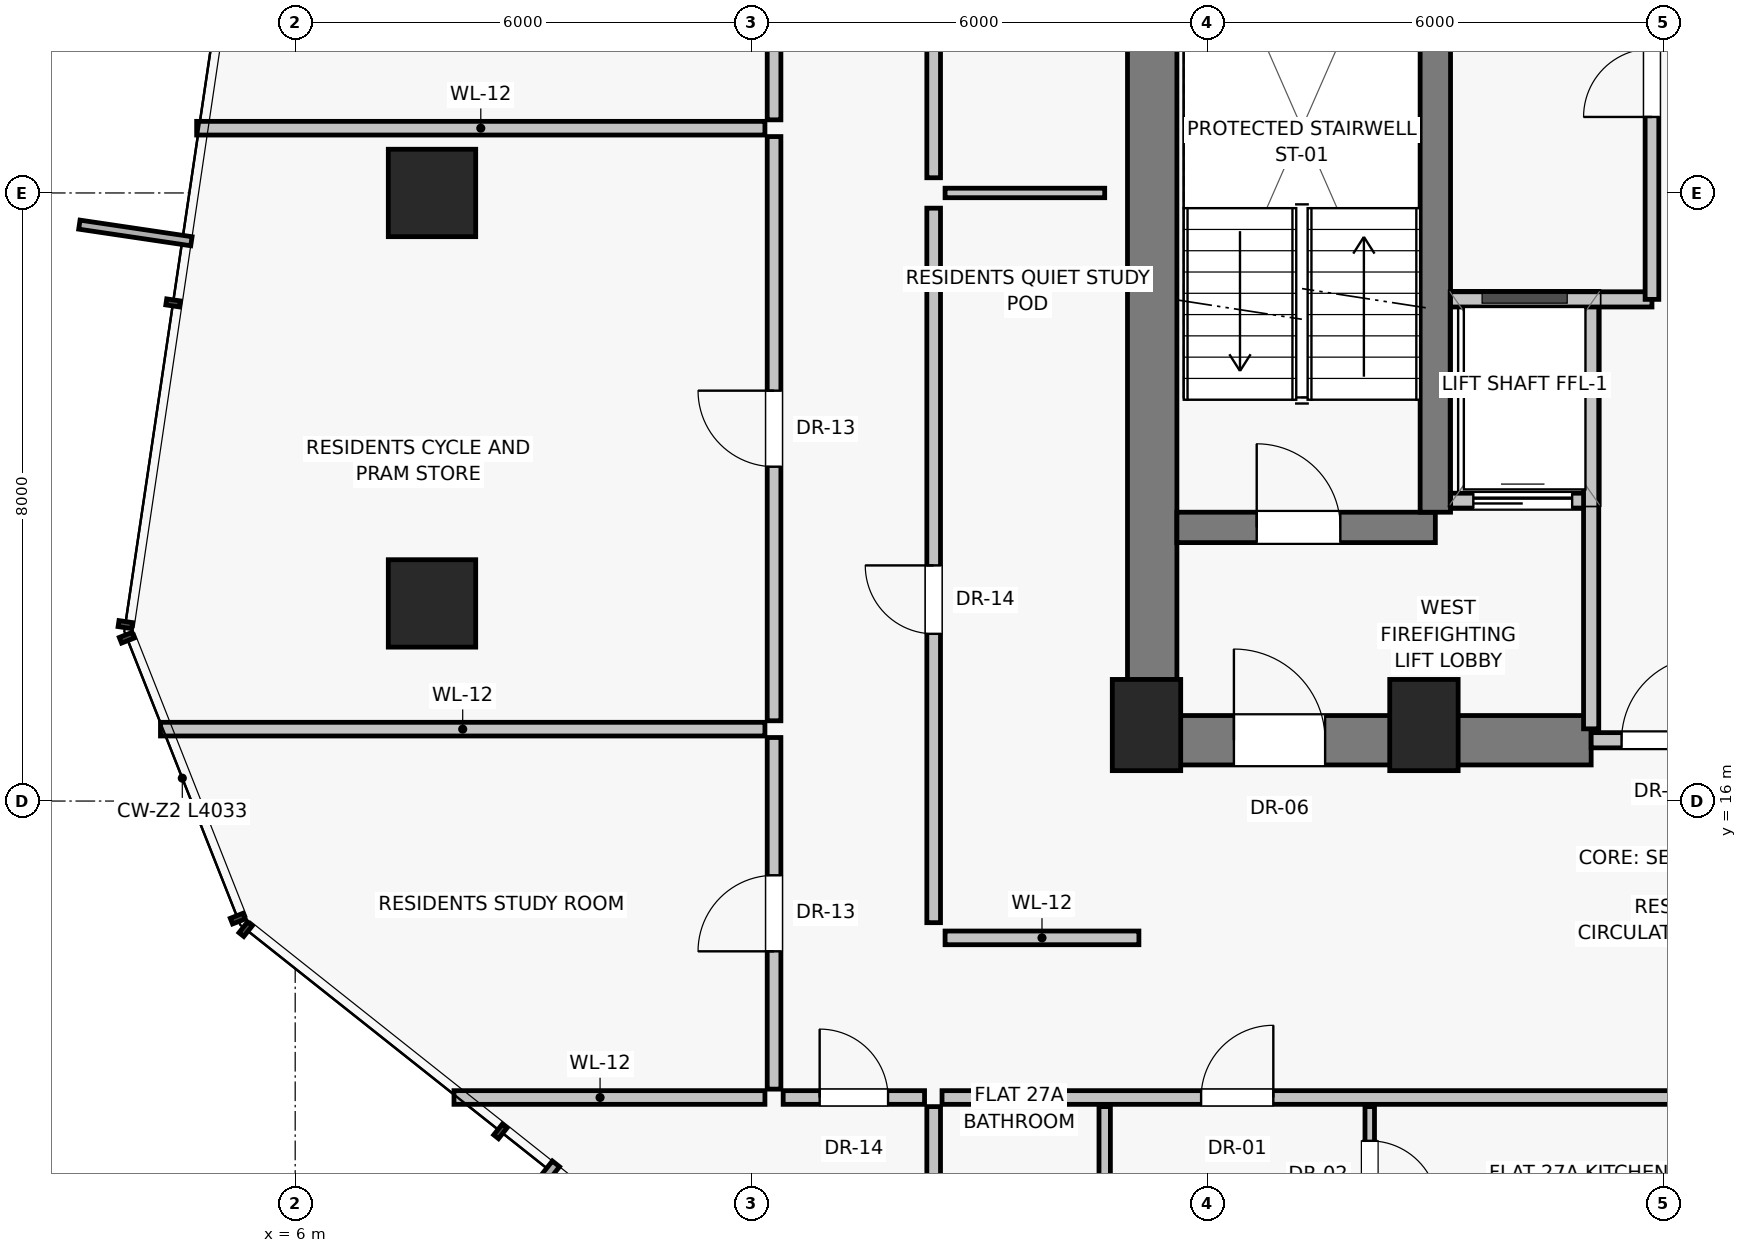
"""IFC4 building model, lengths in metres.
Left out: names, types, materials, properties, quantities, classifications, styles, units other than length and angle.
Written with IfcOpenShell. Run it as: python <this file> out.ifc"""

import sys

from ifc_helpers import new_model, si_unit, direction, frame, frame_2d, origin, origin_2d, place, context, subcontext, project, spatial, rectangle, extrude, source, transform, mapped, element, fill, save


model = new_model("IFC4")
c1 = context("Model", 3, precision=1e-05, world=origin(), true_north=direction((0.0, 1.0)))
c2 = subcontext(c1, "Body", "Model", "MODEL_VIEW")
j1 = project(units=[si_unit("LENGTHUNIT", "METRE"), si_unit("PLANEANGLEUNIT", "RADIAN")], contexts=[c1])
p1 = place(None, origin())
s1 = spatial("IfcSite", under=j1, at=p1, CompositionType="ELEMENT")
p2 = place(p1, origin())
s2 = spatial("IfcBuilding", under=s1, at=p2, CompositionType="ELEMENT")
p3 = place(p2, frame((0.0, 0.0, 99.2)))
s3 = spatial("IfcBuildingStorey", under=s2, at=p3, CompositionType="ELEMENT", Elevation=99.2)
for number, where, z_axis, x_axis in (
    (1, (17.2, 17.0, 0.0), (0.0, 0.0, 1.0), (1.0, 0.0, 0.0)),
    (2, (20.85, 17.0, 0.0), (0.0, 0.0, 1.0), (1.0, 0.0, 0.0)),
):
    element("IfcColumn", number, at=place(p3, frame(where, z_axis=z_axis, x_axis=x_axis)), inside=s3, PredefinedType="PILASTER", context=c2, shape_type="SweptSolid", body=[
        extrude(rectangle(XDim=0.9, YDim=1.2, at=origin_2d()), origin(), (0.0, 0.0, 1.0), 3.25),
    ])
for number, where, z_axis, x_axis in (
    (3, (7.8, 24.0, 0.0), (0.0, 0.0, 1.0), (1.0, 0.0, 0.0)),
    (4, (7.8, 18.6, 0.0), (0.0, 0.0, 1.0), (1.0, 0.0, 0.0)),
):
    element("IfcColumn", number, at=place(p3, frame(where, z_axis=z_axis, x_axis=x_axis)), inside=s3, PredefinedType="COLUMN", context=c2, shape_type="SweptSolid", body=[
        extrude(rectangle(XDim=1.15, YDim=1.15, at=origin_2d()), origin(), (0.0, 0.0, 1.0), 3.25),
    ])
p4 = place(p3, frame((17.275, 16.8, 0.0), z_axis=(0.0, 0.0, 1.0), x_axis=(0.0, 1.0, 0.0)))
e5 = element("IfcWall", 5, at=p4, inside=s3, PredefinedType="SHEAR", context=c2, shape_type="SweptSolid", body=[
    extrude(rectangle(XDim=14.2, YDim=0.65, at=frame_2d((7.1, 0.0))), origin(), (0.0, 0.0, 1.0), 3.0),
])
p5 = place(p3, frame((17.2, 16.8, 0.0), z_axis=(0.0, 0.0, 1.0), x_axis=(1.0, 0.0, 0.0)))
e6 = element("IfcWall", 6, at=p5, inside=s3, PredefinedType="SHEAR", context=c2, shape_type="SweptSolid", body=[
    extrude(rectangle(XDim=5.85, YDim=0.65, at=frame_2d((2.925, 0.0))), origin(), (0.0, 0.0, 1.0), 3.0),
])
p6 = place(p5, frame((1.15, 0.0, 0.0)))
e7 = element("IfcOpeningElement", 7, at=p6, cuts=e6, PredefinedType="OPENING", context=c2, shape_type="SweptSolid", body=[
    extrude(rectangle(XDim=1.2, YDim=2.03, at=frame_2d((0.6, 1.015))), frame((0.0, 0.335, 0.0), z_axis=(0.0, -1.0, 0.0), x_axis=(1.0, 0.0, 0.0)), (0.0, 0.0, 1.0), 0.67),
])
p7 = place(p3, frame((23.05, 16.8, 0.0), z_axis=(0.0, 0.0, 1.0), x_axis=(1.0, 0.0, 0.0)))
e8 = element("IfcWall", 8, at=p7, inside=s3, PredefinedType="SOLIDWALL", context=c2, shape_type="SweptSolid", body=[
    extrude(rectangle(XDim=1.9, YDim=0.2, at=frame_2d((0.95, 0.0))), origin(), (0.0, 0.0, 1.0), 2.15),
])
p8 = place(p7, frame((0.4, 0.0, 0.0)))
e9 = element("IfcOpeningElement", 9, at=p8, cuts=e8, PredefinedType="OPENING", context=c2, shape_type="SweptSolid", body=[
    extrude(rectangle(XDim=1.1, YDim=2.03, at=frame_2d((0.55, 1.015))), frame((0.0, 0.11, 0.0), z_axis=(0.0, -1.0, 0.0), x_axis=(1.0, 0.0, 0.0)), (0.0, 0.0, 1.0), 0.22),
])
p9 = place(p3, frame((17.6, 19.6, 0.0), z_axis=(0.0, 0.0, 1.0), x_axis=(1.0, 0.0, 0.0)))
e10 = element("IfcWall", 10, at=p9, inside=s3, PredefinedType="SHEAR", context=c2, shape_type="SweptSolid", body=[
    extrude(rectangle(XDim=3.4, YDim=0.4, at=frame_2d((1.7, 0.0))), origin(), (0.0, 0.0, 1.0), 3.0),
])
p10 = place(p9, frame((1.05, 0.0, 0.0)))
e11 = element("IfcOpeningElement", 11, at=p10, cuts=e10, PredefinedType="OPENING", context=c2, shape_type="SweptSolid", body=[
    extrude(rectangle(XDim=1.1, YDim=2.03, at=frame_2d((0.55, 1.015))), frame((0.0, 0.21, 0.0), z_axis=(0.0, -1.0, 0.0), x_axis=(1.0, 0.0, 0.0)), (0.0, 0.0, 1.0), 0.42),
])
p11 = place(p3, frame((21.2, 19.95, 0.0), z_axis=(0.0, 0.0, 1.0), x_axis=(1.0, 0.0, 0.0)))
e12 = element("IfcWall", 12, at=p11, inside=s3, PredefinedType="SOLIDWALL", context=c2, shape_type="SweptSolid", body=[
    extrude(rectangle(XDim=1.85, YDim=0.2, at=frame_2d((0.925, 0.0))), origin(), (0.0, 0.0, 1.0), 3.0),
])
p12 = place(p11, frame((0.3, 0.0, 0.0)))
e13 = element("IfcOpeningElement", 13, at=p12, cuts=e12, PredefinedType="OPENING", context=c2, shape_type="SweptSolid", body=[
    extrude(rectangle(XDim=1.3, YDim=2.25, at=frame_2d((0.65, 1.125))), frame((0.0, 0.11, 0.0), z_axis=(0.0, -1.0, 0.0), x_axis=(1.0, 0.0, 0.0)), (0.0, 0.0, 1.0), 0.22),
])
p13 = place(p3, frame((21.0, 19.8, 0.0), z_axis=(0.0, 0.0, 1.0), x_axis=(0.0, 1.0, 0.0)))
e14 = element("IfcWall", 14, at=p13, inside=s3, PredefinedType="SHEAR", context=c2, shape_type="SweptSolid", body=[
    extrude(rectangle(XDim=8.8, YDim=0.4, at=frame_2d((4.4, 0.0))), origin(), (0.0, 0.0, 1.0), 3.0),
])
p14 = place(p3, frame((23.05, 16.95, 0.0), z_axis=(0.0, 0.0, 1.0), x_axis=(0.0, 1.0, 0.0)))
e15 = element("IfcWall", 15, at=p14, inside=s3, PredefinedType="SOLIDWALL", context=c2, shape_type="SweptSolid", body=[
    extrude(rectangle(XDim=5.6, YDim=0.2, at=frame_2d((2.8, 0.0))), origin(), (0.0, 0.0, 1.0), 3.0),
])
p15 = place(p3, frame((21.2, 22.6, 0.0), z_axis=(0.0, 0.0, 1.0), x_axis=(1.0, 0.0, 0.0)))
e16 = element("IfcWall", 16, at=p15, inside=s3, PredefinedType="SOLIDWALL", context=c2, shape_type="SweptSolid", body=[
    extrude(rectangle(XDim=2.65, YDim=0.2, at=frame_2d((1.325, 0.0))), origin(), (0.0, 0.0, 1.0), 3.0),
])
p16 = place(p3, frame((23.85, 22.6, 0.0), z_axis=(0.0, 0.0, 1.0), x_axis=(0.0, 1.0, 0.0)))
e17 = element("IfcWall", 17, at=p16, inside=s3, PredefinedType="PARTITIONING", context=c2, shape_type="SweptSolid", body=[
    extrude(rectangle(XDim=6.1, YDim=0.18, at=frame_2d((3.05, 0.0))), origin(), (0.0, 0.0, 1.0), 3.0),
])
p17 = place(p16, frame((2.4, 0.0, 0.0)))
e18 = element("IfcOpeningElement", 18, at=p17, cuts=e17, PredefinedType="OPENING", context=c2, shape_type="SweptSolid", body=[
    extrude(rectangle(XDim=0.9, YDim=2.01, at=frame_2d((0.45, 1.005))), frame((0.0, 0.1, 0.0), z_axis=(0.0, -1.0, 0.0), x_axis=(1.0, 0.0, 0.0)), (0.0, 0.0, 1.0), 0.2),
])
p18 = place(p3, frame((14.4, 14.4, 0.0), z_axis=(0.0, 0.0, 1.0), x_axis=(0.0, 1.0, 0.0)))
e19 = element("IfcWall", 19, at=p18, inside=s3, PredefinedType="PARTITIONING", context=c2, shape_type="SweptSolid", body=[
    extrude(rectangle(XDim=9.4, YDim=0.18, at=frame_2d((4.7, 0.0))), origin(), (0.0, 0.0, 1.0), 3.0),
])
p19 = place(p18, frame((3.8, 0.0, 0.0)))
e20 = element("IfcOpeningElement", 20, at=p19, cuts=e19, PredefinedType="OPENING", context=c2, shape_type="SweptSolid", body=[
    extrude(rectangle(XDim=0.9, YDim=2.01, at=frame_2d((0.45, 1.005))), frame((0.0, 0.1, 0.0), z_axis=(0.0, -1.0, 0.0), x_axis=(1.0, 0.0, 0.0)), (0.0, 0.0, 1.0), 0.2),
])
p20 = place(p3, frame((14.4, 24.2, 0.0), z_axis=(0.0, 0.0, 1.0), x_axis=(0.0, 1.0, 0.0)))
e21 = element("IfcWall", 21, at=p20, inside=s3, PredefinedType="PARTITIONING", context=c2, shape_type="SweptSolid", body=[
    extrude(rectangle(XDim=9.2, YDim=0.18, at=frame_2d((4.6, 0.0))), origin(), (0.0, 0.0, 1.0), 3.0),
])
p21 = place(p20, frame((3.8, 0.0, 0.0)))
e22 = element("IfcOpeningElement", 22, at=p21, cuts=e21, PredefinedType="OPENING", context=c2, shape_type="SweptSolid", body=[
    extrude(rectangle(XDim=0.9, YDim=2.01, at=frame_2d((0.45, 1.005))), frame((0.0, 0.1, 0.0), z_axis=(0.0, -1.0, 0.0), x_axis=(1.0, 0.0, 0.0)), (0.0, 0.0, 1.0), 0.2),
])
p22 = place(p3, frame((14.55, 24.0, 0.0), z_axis=(0.0, 0.0, 1.0), x_axis=(1.0, 0.0, 0.0)))
e23 = element("IfcWall", 23, at=p22, inside=s3, PredefinedType="PARTITIONING", context=c2, shape_type="SweptSolid", body=[
    extrude(rectangle(XDim=2.1, YDim=0.125, at=frame_2d((1.05, 0.0))), origin(), (0.0, 0.0, 1.0), 3.0),
])
p23 = place(p3, frame((14.55, 14.2, 0.0), z_axis=(0.0, 0.0, 1.0), x_axis=(1.0, 0.0, 0.0)))
e24 = element("IfcWall", 24, at=p23, inside=s3, PredefinedType="PARTITIONING", context=c2, shape_type="SweptSolid", body=[
    extrude(rectangle(XDim=2.55, YDim=0.18, at=frame_2d((1.275, 0.0))), origin(), (0.0, 0.0, 1.0), 3.0),
])
p24 = place(p3, frame((14.4, 11.98, 0.0), z_axis=(0.0, 0.0, 1.0), x_axis=(0.0, -1.0, 0.0)))
e25 = element("IfcWall", 25, at=p24, inside=s3, PredefinedType="PARTITIONING", context=c2, shape_type="SweptSolid", body=[
    extrude(rectangle(XDim=4.889, YDim=0.18, at=frame_2d((2.444, 0.0))), origin(), (0.0, 0.0, 1.0), 3.0),
])
p25 = place(p3, frame((14.51, 12.1, 0.0), z_axis=(0.0, 0.0, 1.0), x_axis=(1.0, 0.0, 0.0)))
e26 = element("IfcWall", 26, at=p25, inside=s3, PredefinedType="PARTITIONING", context=c2, shape_type="SweptSolid", body=[
    extrude(rectangle(XDim=10.024, YDim=0.18, at=frame_2d((5.012, 0.0))), origin(), (0.0, 0.0, 1.0), 2.58),
])
p26 = place(p25, frame((3.408, 0.0, 0.0)))
e27 = element("IfcOpeningElement", 27, at=p26, cuts=e26, PredefinedType="OPENING", context=c2, shape_type="SweptSolid", body=[
    extrude(rectangle(XDim=0.95, YDim=2.02, at=frame_2d((0.475, 1.01))), frame((0.0, 0.1, 0.0), z_axis=(0.0, -1.0, 0.0), x_axis=(1.0, 0.0, 0.0)), (0.0, 0.0, 1.0), 0.2),
])
p27 = place(p3, frame((16.65, 11.98, 0.0), z_axis=(0.0, 0.0, 1.0), x_axis=(0.0, -1.0, 0.0)))
e28 = element("IfcWall", 28, at=p27, inside=s3, PredefinedType="PARTITIONING", context=c2, shape_type="SweptSolid", body=[
    extrude(rectangle(XDim=1.8, YDim=0.15, at=frame_2d((0.9, 0.0))), origin(), (0.0, 0.0, 1.0), 3.0),
])
p28 = place(p3, frame((20.137, 11.98, 0.0), z_axis=(0.0, 0.0, 1.0), x_axis=(0.0, -1.0, 0.0)))
e29 = element("IfcWall", 29, at=p28, inside=s3, PredefinedType="PARTITIONING", context=c2, shape_type="SweptSolid", body=[
    extrude(rectangle(XDim=1.8, YDim=0.125, at=frame_2d((0.9, 0.0))), origin(), (0.0, 0.0, 1.0), 3.0),
])
p29 = place(p28, frame((0.45, 0.0, 0.0)))
e30 = element("IfcOpeningElement", 30, at=p29, cuts=e29, PredefinedType="OPENING", context=c2, shape_type="SweptSolid", body=[
    extrude(rectangle(XDim=0.9, YDim=2.01, at=frame_2d((0.45, 1.005))), frame((0.0, 0.073, 0.0), z_axis=(0.0, -1.0, 0.0), x_axis=(1.0, 0.0, 0.0)), (0.0, 0.0, 1.0), 0.145),
])
p30 = place(p3, frame((12.18, 12.1, 0.0), z_axis=(0.0, 0.0, 1.0), x_axis=(-1.0, 0.0, 0.0)))
e31 = element("IfcWall", 31, at=p30, inside=s3, PredefinedType="PARTITIONING", context=c2, shape_type="SweptSolid", body=[
    extrude(rectangle(XDim=4.091, YDim=0.18, at=frame_2d((2.045, 0.0))), origin(), (0.0, 0.0, 1.0), 3.0),
])
p31 = place(p3, frame((12.3, 12.21, 0.0), z_axis=(0.0, 0.0, 1.0), x_axis=(0.0, 1.0, 0.0)))
e32 = element("IfcWall", 32, at=p31, inside=s3, PredefinedType="PARTITIONING", context=c2, shape_type="SweptSolid", body=[
    extrude(rectangle(XDim=4.626, YDim=0.18, at=frame_2d((2.313, 0.0))), origin(), (0.0, 0.0, 1.0), 3.0),
])
p32 = place(p31, frame((1.813, 0.0, 0.0)))
e33 = element("IfcOpeningElement", 33, at=p32, cuts=e32, PredefinedType="OPENING", context=c2, shape_type="SweptSolid", body=[
    extrude(rectangle(XDim=1.0, YDim=2.01, at=frame_2d((0.5, 1.005))), frame((0.0, 0.1, 0.0), z_axis=(0.0, -1.0, 0.0), x_axis=(1.0, 0.0, 0.0)), (0.0, 0.0, 1.0), 0.2),
])
p33 = place(p3, frame((12.3, 17.056, 0.0), z_axis=(0.0, 0.0, 1.0), x_axis=(0.0, 1.0, 0.0)))
e34 = element("IfcWall", 34, at=p33, inside=s3, PredefinedType="PARTITIONING", context=c2, shape_type="SweptSolid", body=[
    extrude(rectangle(XDim=7.686, YDim=0.18, at=frame_2d((3.843, 0.0))), origin(), (0.0, 0.0, 1.0), 2.58),
])
p34 = place(p33, frame((3.343, 0.0, 0.0)))
e35 = element("IfcOpeningElement", 35, at=p34, cuts=e34, PredefinedType="OPENING", context=c2, shape_type="SweptSolid", body=[
    extrude(rectangle(XDim=1.0, YDim=2.01, at=frame_2d((0.5, 1.005))), frame((0.0, 0.1, 0.0), z_axis=(0.0, -1.0, 0.0), x_axis=(1.0, 0.0, 0.0)), (0.0, 0.0, 1.0), 0.2),
])
p35 = place(p3, frame((12.18, 16.946, 0.0), z_axis=(0.0, 0.0, 1.0), x_axis=(-1.0, 0.0, 0.0)))
e36 = element("IfcWall", 36, at=p35, inside=s3, PredefinedType="PARTITIONING", context=c2, shape_type="SweptSolid", body=[
    extrude(rectangle(XDim=7.952, YDim=0.18, at=frame_2d((3.976, 0.0))), origin(), (0.0, 0.0, 1.0), 3.0),
])
p36 = place(p3, frame((12.18, 24.852, 0.0), z_axis=(0.0, 0.0, 1.0), x_axis=(-1.0, 0.0, 0.0)))
e37 = element("IfcWall", 37, at=p36, inside=s3, PredefinedType="PARTITIONING", context=c2, shape_type="SweptSolid", body=[
    extrude(rectangle(XDim=7.476, YDim=0.18, at=frame_2d((3.738, 0.0))), origin(), (0.0, 0.0, 1.0), 3.0),
])
p37 = place(p3, frame((12.3, 24.962, 0.0), z_axis=(0.0, 0.0, 1.0), x_axis=(0.0, 1.0, 0.0)))
e38 = element("IfcWall", 38, at=p37, inside=s3, PredefinedType="PARTITIONING", context=c2, shape_type="SweptSolid", body=[
    extrude(rectangle(XDim=3.902, YDim=0.18, at=frame_2d((1.951, 0.0))), origin(), (0.0, 0.0, 1.0), 2.58),
])
p38 = place(p37, frame((1.451, 0.0, 0.0)))
e39 = element("IfcOpeningElement", 39, at=p38, cuts=e38, PredefinedType="OPENING", context=c2, shape_type="SweptSolid", body=[
    extrude(rectangle(XDim=1.0, YDim=2.01, at=frame_2d((0.5, 1.005))), frame((0.0, 0.1, 0.0), z_axis=(0.0, -1.0, 0.0), x_axis=(1.0, 0.0, 0.0)), (0.0, 0.0, 1.0), 0.2),
])
p39 = place(p3, frame((12.42, 12.1, 0.0), z_axis=(0.0, 0.0, 1.0), x_axis=(1.0, 0.0, 0.0)))
e40 = element("IfcWall", 40, at=p39, inside=s3, PredefinedType="PARTITIONING", context=c2, shape_type="SweptSolid", body=[
    extrude(rectangle(XDim=1.86, YDim=0.18, at=frame_2d((0.93, 0.0))), origin(), (0.0, 0.0, 1.0), 3.0),
])
p40 = place(p39, frame((0.48, 0.0, 0.0)))
e41 = element("IfcOpeningElement", 41, at=p40, cuts=e40, PredefinedType="OPENING", context=c2, shape_type="SweptSolid", body=[
    extrude(rectangle(XDim=0.9, YDim=2.01, at=frame_2d((0.45, 1.005))), frame((0.0, 0.1, 0.0), z_axis=(0.0, -1.0, 0.0), x_axis=(1.0, 0.0, 0.0)), (0.0, 0.0, 1.0), 0.2),
])
m1 = source(origin(), c2, "Body", "SweptSolid", [
    extrude(rectangle(XDim=1.2, YDim=2.03, at=frame_2d((0.6, 1.015))), frame((0.0, 0.025, 0.0), z_axis=(0.0, -1.0, 0.0), x_axis=(1.0, 0.0, 0.0)), (0.0, 0.0, 1.0), 0.05),
])
p41 = place(p6, origin())
e42 = element("IfcDoor", 42, at=p41, inside=s3, OperationType="SINGLE_SWING_LEFT", PredefinedType="DOOR", context=c2, shape_type="MappedRepresentation", body=[
    mapped(m1, transform((0.0, 0.0, 0.0), scale=1.0)),
])
fill(e7, e42)
m2 = source(origin(), c2, "Body", "SweptSolid", [
    extrude(rectangle(XDim=1.1, YDim=2.03, at=frame_2d((0.55, 1.015))), frame((0.0, 0.025, 0.0), z_axis=(0.0, -1.0, 0.0), x_axis=(1.0, 0.0, 0.0)), (0.0, 0.0, 1.0), 0.05),
])
p42 = place(p8, origin())
e43 = element("IfcDoor", 43, at=p42, inside=s3, OperationType="SINGLE_SWING_RIGHT", PredefinedType="DOOR", context=c2, shape_type="MappedRepresentation", body=[
    mapped(m2, transform((0.0, 0.0, 0.0), scale=1.0)),
])
fill(e9, e43)
p43 = place(p10, origin())
e44 = element("IfcDoor", 44, at=p43, inside=s3, OperationType="SINGLE_SWING_LEFT", PredefinedType="DOOR", context=c2, shape_type="MappedRepresentation", body=[
    mapped(m2, transform((0.0, 0.0, 0.0), scale=1.0)),
])
fill(e11, e44)
m3 = source(origin(), c2, "Body", "SweptSolid", [
    extrude(rectangle(XDim=1.3, YDim=2.25, at=frame_2d((0.65, 1.125))), frame((0.0, 0.025, 0.0), z_axis=(0.0, -1.0, 0.0), x_axis=(1.0, 0.0, 0.0)), (0.0, 0.0, 1.0), 0.05),
])
p44 = place(p12, origin())
e45 = element("IfcDoor", 45, at=p44, inside=s3, OperationType="SLIDING_TO_LEFT", PredefinedType="DOOR", context=c2, shape_type="MappedRepresentation", body=[
    mapped(m3, transform((0.0, 0.0, 0.0), scale=1.0)),
])
fill(e13, e45)
m4 = source(origin(), c2, "Body", "SweptSolid", [
    extrude(rectangle(XDim=0.9, YDim=2.01, at=frame_2d((0.45, 1.005))), frame((0.0, 0.025, 0.0), z_axis=(0.0, -1.0, 0.0), x_axis=(1.0, 0.0, 0.0)), (0.0, 0.0, 1.0), 0.05),
])
p45 = place(p17, origin())
e46 = element("IfcDoor", 46, at=p45, inside=s3, OperationType="SINGLE_SWING_LEFT", PredefinedType="DOOR", context=c2, shape_type="MappedRepresentation", body=[
    mapped(m4, transform((0.0, 0.0, 0.0), scale=1.0)),
])
fill(e18, e46)
p46 = place(p19, origin())
e47 = element("IfcDoor", 47, at=p46, inside=s3, OperationType="SINGLE_SWING_RIGHT", PredefinedType="DOOR", context=c2, shape_type="MappedRepresentation", body=[
    mapped(m4, transform((0.0, 0.0, 0.0), scale=1.0)),
])
fill(e20, e47)
m5 = source(origin(), c2, "Body", "SweptSolid", [
    extrude(rectangle(XDim=0.95, YDim=2.02, at=frame_2d((0.475, 1.01))), frame((0.0, 0.025, 0.0), z_axis=(0.0, -1.0, 0.0), x_axis=(1.0, 0.0, 0.0)), (0.0, 0.0, 1.0), 0.05),
])
p47 = place(p26, origin())
e48 = element("IfcDoor", 48, at=p47, inside=s3, OperationType="SINGLE_SWING_RIGHT", PredefinedType="DOOR", context=c2, shape_type="MappedRepresentation", body=[
    mapped(m5, transform((0.0, 0.0, 0.0), scale=1.0)),
])
fill(e27, e48)
p48 = place(p29, origin())
e49 = element("IfcDoor", 49, at=p48, inside=s3, OperationType="SINGLE_SWING_RIGHT", PredefinedType="DOOR", context=c2, shape_type="MappedRepresentation", body=[
    mapped(m4, transform((0.0, 0.0, 0.0), scale=1.0)),
])
fill(e30, e49)
m6 = source(origin(), c2, "Body", "SweptSolid", [
    extrude(rectangle(XDim=1.0, YDim=2.01, at=frame_2d((0.5, 1.005))), frame((0.0, 0.025, 0.0), z_axis=(0.0, -1.0, 0.0), x_axis=(1.0, 0.0, 0.0)), (0.0, 0.0, 1.0), 0.05),
])
p49 = place(p32, origin())
e50 = element("IfcDoor", 50, at=p49, inside=s3, OperationType="SINGLE_SWING_LEFT", PredefinedType="DOOR", context=c2, shape_type="MappedRepresentation", body=[
    mapped(m6, transform((0.0, 0.0, 0.0), scale=1.0)),
])
fill(e33, e50)
p50 = place(p34, origin())
e51 = element("IfcDoor", 51, at=p50, inside=s3, OperationType="SINGLE_SWING_RIGHT", PredefinedType="DOOR", context=c2, shape_type="MappedRepresentation", body=[
    mapped(m6, transform((0.0, 0.0, 0.0), scale=1.0)),
])
fill(e35, e51)
p51 = place(p40, origin())
e52 = element("IfcDoor", 52, at=p51, inside=s3, OperationType="SINGLE_SWING_LEFT", PredefinedType="DOOR", context=c2, shape_type="MappedRepresentation", body=[
    mapped(m4, transform((0.0, 0.0, 0.0), scale=1.0)),
])
fill(e41, e52)
save(model, sys.argv[1])
